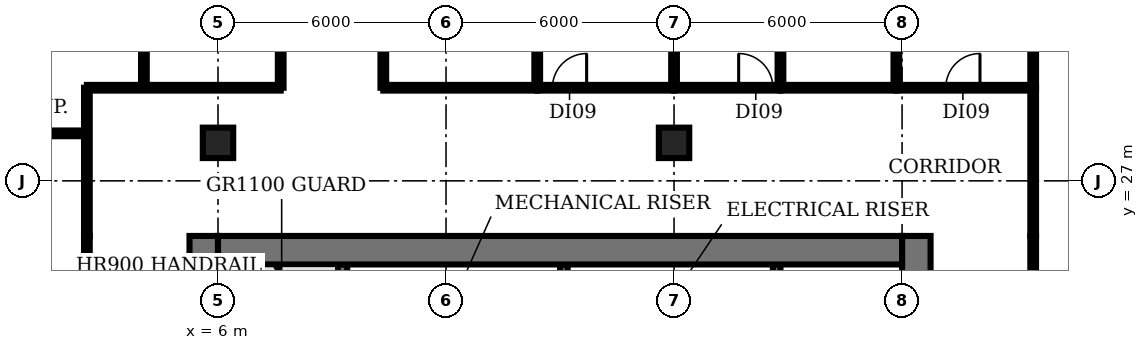
"""IFC4 building model, lengths in metres.
Left out: names, types, materials, properties, quantities, classifications, styles, units other than length and angle.
Written with IfcOpenShell. Run it as: python <this file> out.ifc"""

import sys

from ifc_helpers import new_model, si_unit, direction, frame, frame_2d, origin, origin_2d, place, context, subcontext, project, spatial, rectangle, extrude, element, fill, save


model = new_model("IFC4")
c1 = context("Model", 3, precision=1e-05, world=origin(), true_north=direction((0.0, 1.0)))
c2 = subcontext(c1, "Body", "Model", "MODEL_VIEW")
j1 = project(units=[si_unit("LENGTHUNIT", "METRE"), si_unit("PLANEANGLEUNIT", "RADIAN")], contexts=[c1])
p1 = place(None, origin())
s1 = spatial("IfcSite", under=j1, at=p1, CompositionType="ELEMENT")
p2 = place(p1, origin())
s2 = spatial("IfcBuilding", under=s1, at=p2, CompositionType="ELEMENT")
p3 = place(p2, frame((0.0, 0.0, 96.2)))
s3 = spatial("IfcBuildingStorey", under=s2, at=p3, CompositionType="ELEMENT", Elevation=96.2)
for number, where, z_axis, x_axis in (
    (1, (6.0, 28.0, 0.0), (0.0, 0.0, 1.0), (1.0, 0.0, 0.0)),
    (2, (18.0, 28.0, 0.0), (0.0, 0.0, 1.0), (1.0, 0.0, 0.0)),
):
    element("IfcColumn", number, at=place(p3, frame(where, z_axis=z_axis, x_axis=x_axis)), inside=s3, PredefinedType="COLUMN", context=c2, shape_type="SweptSolid", body=[
        extrude(rectangle(XDim=0.8, YDim=0.8, at=origin_2d()), origin(), (0.0, 0.0, 1.0), 3.85),
    ])
p4 = place(p3, frame((9.275, 18.375, 0.0), z_axis=(0.0, 0.0, 1.0), x_axis=(0.0, 1.0, 0.0)))
e3 = element("IfcWall", 3, at=p4, inside=s3, PredefinedType="SHEAR", context=c2, shape_type="SweptSolid", body=[
    extrude(rectangle(XDim=6.425, YDim=0.25, at=frame_2d((3.212, 0.0))), origin(), (0.0, 0.0, 1.0), 3.85),
])
for number, where, z_axis, x_axis in (
    (4, (15.1, 22.9, 0.0), (0.0, 0.0, 1.0), (0.0, 1.0, 0.0)),
    (5, (20.7, 22.9, 0.0), (0.0, 0.0, 1.0), (0.0, 1.0, 0.0)),
):
    element("IfcWall", number, at=place(p3, frame(where, z_axis=z_axis, x_axis=x_axis)), inside=s3, PredefinedType="SHEAR", context=c2, shape_type="SweptSolid", body=[
        extrude(rectangle(XDim=1.9, YDim=0.2, at=frame_2d((0.95, 0.0))), origin(), (0.0, 0.0, 1.0), 3.85),
    ])
p5 = place(p3, frame((5.625, 4.47, 0.0), z_axis=(0.0, 0.0, 1.0), x_axis=(0.0, 1.0, 0.0)))
e6 = element("IfcWall", 6, at=p5, inside=s3, PredefinedType="SHEAR", context=c2, shape_type="SweptSolid", body=[
    extrude(rectangle(XDim=21.08, YDim=0.75, at=frame_2d((10.54, 0.0))), origin(), (0.0, 0.0, 1.0), 3.85),
])
p6 = place(p5, frame((1.18, 0.0, 0.0)))
e7 = element("IfcOpeningElement", 7, at=p6, cuts=e6, PredefinedType="OPENING", context=c2, shape_type="SweptSolid", body=[
    extrude(rectangle(XDim=1.5, YDim=2.1, at=frame_2d((0.75, 1.05))), frame((0.0, 0.385, 0.0), z_axis=(0.0, -1.0, 0.0), x_axis=(1.0, 0.0, 0.0)), (0.0, 0.0, 1.0), 0.77),
])
p7 = place(p5, frame((7.63, 0.0, 0.0)))
e8 = element("IfcOpeningElement", 8, at=p7, cuts=e6, PredefinedType="OPENING", context=c2, shape_type="SweptSolid", body=[
    extrude(rectangle(XDim=1.2, YDim=2.1, at=frame_2d((0.6, 1.05))), frame((0.0, 0.385, 0.0), z_axis=(0.0, -1.0, 0.0), x_axis=(1.0, 0.0, 0.0)), (0.0, 0.0, 1.0), 0.77),
])
p8 = place(p5, frame((14.18, 0.0, 0.0)))
e9 = element("IfcOpeningElement", 9, at=p8, cuts=e6, PredefinedType="OPENING", context=c2, shape_type="SweptSolid", body=[
    extrude(rectangle(XDim=1.2, YDim=2.1, at=frame_2d((0.6, 1.05))), frame((0.0, 0.385, 0.0), z_axis=(0.0, -1.0, 0.0), x_axis=(1.0, 0.0, 0.0)), (0.0, 0.0, 1.0), 0.77),
])
p9 = place(p3, frame((24.375, 25.55, 0.0), z_axis=(0.0, 0.0, 1.0), x_axis=(0.0, -1.0, 0.0)))
e10 = element("IfcWall", 10, at=p9, inside=s3, PredefinedType="SHEAR", context=c2, shape_type="SweptSolid", body=[
    extrude(rectangle(XDim=21.13, YDim=0.75, at=frame_2d((10.565, 0.0))), origin(), (0.0, 0.0, 1.0), 3.85),
])
p10 = place(p9, frame((18.4, 0.0, 0.0)))
e11 = element("IfcOpeningElement", 11, at=p10, cuts=e10, PredefinedType="OPENING", context=c2, shape_type="SweptSolid", body=[
    extrude(rectangle(XDim=1.5, YDim=2.1, at=frame_2d((0.75, 1.05))), frame((0.0, 0.385, 0.0), z_axis=(0.0, -1.0, 0.0), x_axis=(1.0, 0.0, 0.0)), (0.0, 0.0, 1.0), 0.77),
])
p11 = place(p9, frame((12.3, 0.0, 0.0)))
e12 = element("IfcOpeningElement", 12, at=p11, cuts=e10, PredefinedType="OPENING", context=c2, shape_type="SweptSolid", body=[
    extrude(rectangle(XDim=0.9, YDim=2.1, at=frame_2d((0.45, 1.05))), frame((0.0, 0.385, 0.0), z_axis=(0.0, -1.0, 0.0), x_axis=(1.0, 0.0, 0.0)), (0.0, 0.0, 1.0), 0.77),
])
p12 = place(p9, frame((6.3, 0.0, 0.0)))
e13 = element("IfcOpeningElement", 13, at=p12, cuts=e10, PredefinedType="OPENING", context=c2, shape_type="SweptSolid", body=[
    extrude(rectangle(XDim=2.0, YDim=2.1, at=frame_2d((1.0, 1.05))), frame((0.0, 0.385, 0.0), z_axis=(0.0, -1.0, 0.0), x_axis=(1.0, 0.0, 0.0)), (0.0, 0.0, 1.0), 0.77),
])
p13 = place(p3, frame((6.0, 25.175, 0.0), z_axis=(0.0, 0.0, 1.0), x_axis=(1.0, 0.0, 0.0)))
e14 = element("IfcWall", 14, at=p13, inside=s3, PredefinedType="SHEAR", context=c2, shape_type="SweptSolid", body=[
    extrude(rectangle(XDim=18.0, YDim=0.75, at=frame_2d((9.0, 0.0))), origin(), (0.0, 0.0, 1.0), 3.85),
])
p14 = place(p3, frame((-0.98, 28.25, 0.0), z_axis=(0.0, 0.0, 1.0), x_axis=(1.0, 0.0, 0.0)))
e15 = element("IfcWall", 15, at=p14, inside=s3, PredefinedType="PARTITIONING", context=c2, shape_type="SweptSolid", body=[
    extrude(rectangle(XDim=3.53, YDim=0.15, at=frame_2d((1.765, 0.0))), origin(), (0.0, 0.0, 1.0), 2.83),
])
p15 = place(p3, frame((2.55, 6.078, 0.0), z_axis=(0.0, 0.0, 1.0), x_axis=(0.0, 1.0, 0.0)))
e16 = element("IfcWall", 16, at=p15, inside=s3, PredefinedType="PARTITIONING", context=c2, shape_type="SweptSolid", body=[
    extrude(rectangle(XDim=19.472, YDim=0.15, at=frame_2d((9.736, 0.0))), origin(), (0.0, 0.0, 1.0), 2.83),
])
p16 = place(p15, frame((7.572, 0.0, 0.0)))
e17 = element("IfcOpeningElement", 17, at=p16, cuts=e16, PredefinedType="OPENING", context=c2, shape_type="SweptSolid", body=[
    extrude(rectangle(XDim=1.2, YDim=2.1, at=frame_2d((0.6, 1.05))), frame((0.0, 0.085, 0.0), z_axis=(0.0, -1.0, 0.0), x_axis=(1.0, 0.0, 0.0)), (0.0, 0.0, 1.0), 0.17),
])
p17 = place(p3, frame((2.55, 25.55, 0.0), z_axis=(0.0, 0.0, 1.0), x_axis=(0.0, 1.0, 0.0)))
e18 = element("IfcWall", 18, at=p17, inside=s3, PredefinedType="PARTITIONING", context=c2, shape_type="SweptSolid", body=[
    extrude(rectangle(XDim=3.9, YDim=0.15, at=frame_2d((1.95, 0.0))), origin(), (0.0, 0.0, 1.0), 2.83),
])
p18 = place(p3, frame((2.55, 29.45, 0.0), z_axis=(0.0, 0.0, 1.0), x_axis=(1.0, 0.0, 0.0)))
e19 = element("IfcWall", 19, at=p18, inside=s3, PredefinedType="PARTITIONING", context=c2, shape_type="SweptSolid", body=[
    extrude(rectangle(XDim=5.1, YDim=0.15, at=frame_2d((2.55, 0.0))), origin(), (0.0, 0.0, 1.0), 2.83),
])
p19 = place(p3, frame((4.05, 29.45, 0.0), z_axis=(0.0, 0.0, 1.0), x_axis=(0.0, 1.0, 0.0)))
e20 = element("IfcWall", 20, at=p19, inside=s3, PredefinedType="PARTITIONING", context=c2, shape_type="SweptSolid", body=[
    extrude(rectangle(XDim=4.8, YDim=0.15, at=frame_2d((2.4, 0.0))), origin(), (0.0, 0.0, 1.0), 2.83),
])
p20 = place(p3, frame((7.65, 29.45, 0.0), z_axis=(0.0, 0.0, 1.0), x_axis=(0.0, 1.0, 0.0)))
e21 = element("IfcWall", 21, at=p20, inside=s3, PredefinedType="PARTITIONING", context=c2, shape_type="SweptSolid", body=[
    extrude(rectangle(XDim=4.8, YDim=0.15, at=frame_2d((2.4, 0.0))), origin(), (0.0, 0.0, 1.0), 2.83),
])
p21 = place(p20, frame((1.9, 0.0, 0.0)))
e22 = element("IfcOpeningElement", 22, at=p21, cuts=e21, PredefinedType="OPENING", context=c2, shape_type="SweptSolid", body=[
    extrude(rectangle(XDim=0.9, YDim=2.1, at=frame_2d((0.45, 1.05))), frame((0.0, 0.085, 0.0), z_axis=(0.0, -1.0, 0.0), x_axis=(1.0, 0.0, 0.0)), (0.0, 0.0, 1.0), 0.17),
])
p22 = place(p3, frame((10.35, 29.45, 0.0), z_axis=(0.0, 0.0, 1.0), x_axis=(0.0, 1.0, 0.0)))
e23 = element("IfcWall", 23, at=p22, inside=s3, PredefinedType="PARTITIONING", context=c2, shape_type="SweptSolid", body=[
    extrude(rectangle(XDim=4.8, YDim=0.15, at=frame_2d((2.4, 0.0))), origin(), (0.0, 0.0, 1.0), 2.83),
])
p23 = place(p3, frame((10.35, 29.45, 0.0), z_axis=(0.0, 0.0, 1.0), x_axis=(1.0, 0.0, 0.0)))
e24 = element("IfcWall", 24, at=p23, inside=s3, PredefinedType="PARTITIONING", context=c2, shape_type="SweptSolid", body=[
    extrude(rectangle(XDim=4.05, YDim=0.15, at=frame_2d((2.025, 0.0))), origin(), (0.0, 0.0, 1.0), 2.83),
])
p24 = place(p3, frame((14.4, 29.45, 0.0), z_axis=(0.0, 0.0, 1.0), x_axis=(0.0, 1.0, 0.0)))
e25 = element("IfcWall", 25, at=p24, inside=s3, PredefinedType="PARTITIONING", context=c2, shape_type="SweptSolid", body=[
    extrude(rectangle(XDim=4.8, YDim=0.15, at=frame_2d((2.4, 0.0))), origin(), (0.0, 0.0, 1.0), 2.83),
])
p25 = place(p3, frame((14.4, 29.45, 0.0), z_axis=(0.0, 0.0, 1.0), x_axis=(1.0, 0.0, 0.0)))
e26 = element("IfcWall", 26, at=p25, inside=s3, PredefinedType="PARTITIONING", context=c2, shape_type="SweptSolid", body=[
    extrude(rectangle(XDim=3.6, YDim=0.15, at=frame_2d((1.8, 0.0))), origin(), (0.0, 0.0, 1.0), 2.83),
])
p26 = place(p25, frame((0.4, 0.0, 0.0)))
e27 = element("IfcOpeningElement", 27, at=p26, cuts=e26, PredefinedType="OPENING", context=c2, shape_type="SweptSolid", body=[
    extrude(rectangle(XDim=0.9, YDim=2.1, at=frame_2d((0.45, 1.05))), frame((0.0, 0.085, 0.0), z_axis=(0.0, -1.0, 0.0), x_axis=(1.0, 0.0, 0.0)), (0.0, 0.0, 1.0), 0.17),
])
p27 = place(p3, frame((18.0, 29.45, 0.0), z_axis=(0.0, 0.0, 1.0), x_axis=(0.0, 1.0, 0.0)))
e28 = element("IfcWall", 28, at=p27, inside=s3, PredefinedType="PARTITIONING", context=c2, shape_type="SweptSolid", body=[
    extrude(rectangle(XDim=4.8, YDim=0.15, at=frame_2d((2.4, 0.0))), origin(), (0.0, 0.0, 1.0), 2.83),
])
p28 = place(p3, frame((18.0, 29.45, 0.0), z_axis=(0.0, 0.0, 1.0), x_axis=(1.0, 0.0, 0.0)))
e29 = element("IfcWall", 29, at=p28, inside=s3, PredefinedType="PARTITIONING", context=c2, shape_type="SweptSolid", body=[
    extrude(rectangle(XDim=2.8, YDim=0.15, at=frame_2d((1.4, 0.0))), origin(), (0.0, 0.0, 1.0), 2.83),
])
p29 = place(p28, frame((1.7, 0.0, 0.0)))
e30 = element("IfcOpeningElement", 30, at=p29, cuts=e29, PredefinedType="OPENING", context=c2, shape_type="SweptSolid", body=[
    extrude(rectangle(XDim=0.9, YDim=2.1, at=frame_2d((0.45, 1.05))), frame((0.0, 0.085, 0.0), z_axis=(0.0, -1.0, 0.0), x_axis=(1.0, 0.0, 0.0)), (0.0, 0.0, 1.0), 0.17),
])
p30 = place(p3, frame((20.8, 29.45, 0.0), z_axis=(0.0, 0.0, 1.0), x_axis=(0.0, 1.0, 0.0)))
e31 = element("IfcWall", 31, at=p30, inside=s3, PredefinedType="PARTITIONING", context=c2, shape_type="SweptSolid", body=[
    extrude(rectangle(XDim=4.8, YDim=0.15, at=frame_2d((2.4, 0.0))), origin(), (0.0, 0.0, 1.0), 2.83),
])
p31 = place(p3, frame((20.8, 29.45, 0.0), z_axis=(0.0, 0.0, 1.0), x_axis=(1.0, 0.0, 0.0)))
e32 = element("IfcWall", 32, at=p31, inside=s3, PredefinedType="PARTITIONING", context=c2, shape_type="SweptSolid", body=[
    extrude(rectangle(XDim=3.05, YDim=0.15, at=frame_2d((1.525, 0.0))), origin(), (0.0, 0.0, 1.0), 2.83),
])
p32 = place(p3, frame((23.85, 29.45, 0.0), z_axis=(0.0, 0.0, 1.0), x_axis=(0.0, 1.0, 0.0)))
e33 = element("IfcWall", 33, at=p32, inside=s3, PredefinedType="PARTITIONING", context=c2, shape_type="SweptSolid", body=[
    extrude(rectangle(XDim=4.8, YDim=0.15, at=frame_2d((2.4, 0.0))), origin(), (0.0, 0.0, 1.0), 2.83),
])
p33 = place(p3, frame((23.85, 29.45, 0.0), z_axis=(0.0, 0.0, 1.0), x_axis=(1.0, 0.0, 0.0)))
e34 = element("IfcWall", 34, at=p33, inside=s3, PredefinedType="PARTITIONING", context=c2, shape_type="SweptSolid", body=[
    extrude(rectangle(XDim=3.6, YDim=0.15, at=frame_2d((1.8, 0.0))), origin(), (0.0, 0.0, 1.0), 2.83),
])
p34 = place(p33, frame((1.3, 0.0, 0.0)))
e35 = element("IfcOpeningElement", 35, at=p34, cuts=e34, PredefinedType="OPENING", context=c2, shape_type="SweptSolid", body=[
    extrude(rectangle(XDim=0.9, YDim=2.1, at=frame_2d((0.45, 1.05))), frame((0.0, 0.085, 0.0), z_axis=(0.0, -1.0, 0.0), x_axis=(1.0, 0.0, 0.0)), (0.0, 0.0, 1.0), 0.17),
])
p35 = place(p3, frame((27.45, 25.55, 0.0), z_axis=(0.0, 0.0, 1.0), x_axis=(0.0, -1.0, 0.0)))
e36 = element("IfcWall", 36, at=p35, inside=s3, PredefinedType="PARTITIONING", context=c2, shape_type="SweptSolid", body=[
    extrude(rectangle(XDim=16.45, YDim=0.15, at=frame_2d((8.225, 0.0))), origin(), (0.0, 0.0, 1.0), 2.83),
])
p36 = place(p35, frame((7.55, 0.0, 0.0)))
e37 = element("IfcOpeningElement", 37, at=p36, cuts=e36, PredefinedType="OPENING", context=c2, shape_type="SweptSolid", body=[
    extrude(rectangle(XDim=1.2, YDim=2.1, at=frame_2d((0.6, 1.05))), frame((0.0, 0.085, 0.0), z_axis=(0.0, -1.0, 0.0), x_axis=(1.0, 0.0, 0.0)), (0.0, 0.0, 1.0), 0.17),
])
p37 = place(p3, frame((27.45, 25.55, 0.0), z_axis=(0.0, 0.0, 1.0), x_axis=(0.0, 1.0, 0.0)))
e38 = element("IfcWall", 38, at=p37, inside=s3, PredefinedType="PARTITIONING", context=c2, shape_type="SweptSolid", body=[
    extrude(rectangle(XDim=3.9, YDim=0.15, at=frame_2d((1.95, 0.0))), origin(), (0.0, 0.0, 1.0), 2.83),
])
p38 = place(p3, frame((27.45, 29.45, 0.0), z_axis=(0.0, 0.0, 1.0), x_axis=(0.0, 1.0, 0.0)))
e39 = element("IfcWall", 39, at=p38, inside=s3, PredefinedType="PARTITIONING", context=c2, shape_type="SweptSolid", body=[
    extrude(rectangle(XDim=2.84, YDim=0.15, at=frame_2d((1.42, 0.0))), origin(), (0.0, 0.0, 1.0), 2.83),
])
p39 = place(p26, origin())
e40 = element("IfcDoor", 40, at=p39, inside=s3, OperationType="SINGLE_SWING_RIGHT", PredefinedType="DOOR", context=c2, shape_type="SweptSolid", body=[
    extrude(rectangle(XDim=0.9, YDim=2.1, at=frame_2d((0.45, 1.05))), frame((0.0, 0.025, 0.0), z_axis=(0.0, -1.0, 0.0), x_axis=(1.0, 0.0, 0.0)), (0.0, 0.0, 1.0), 0.05),
])
fill(e27, e40)
p40 = place(p29, origin())
e41 = element("IfcDoor", 41, at=p40, inside=s3, OperationType="SINGLE_SWING_LEFT", PredefinedType="DOOR", context=c2, shape_type="SweptSolid", body=[
    extrude(rectangle(XDim=0.9, YDim=2.1, at=frame_2d((0.45, 1.05))), frame((0.0, 0.025, 0.0), z_axis=(0.0, -1.0, 0.0), x_axis=(1.0, 0.0, 0.0)), (0.0, 0.0, 1.0), 0.05),
])
fill(e30, e41)
p41 = place(p34, origin())
e42 = element("IfcDoor", 42, at=p41, inside=s3, OperationType="SINGLE_SWING_RIGHT", PredefinedType="DOOR", context=c2, shape_type="SweptSolid", body=[
    extrude(rectangle(XDim=0.9, YDim=2.1, at=frame_2d((0.45, 1.05))), frame((0.0, 0.025, 0.0), z_axis=(0.0, -1.0, 0.0), x_axis=(1.0, 0.0, 0.0)), (0.0, 0.0, 1.0), 0.05),
])
fill(e35, e42)
save(model, sys.argv[1])
